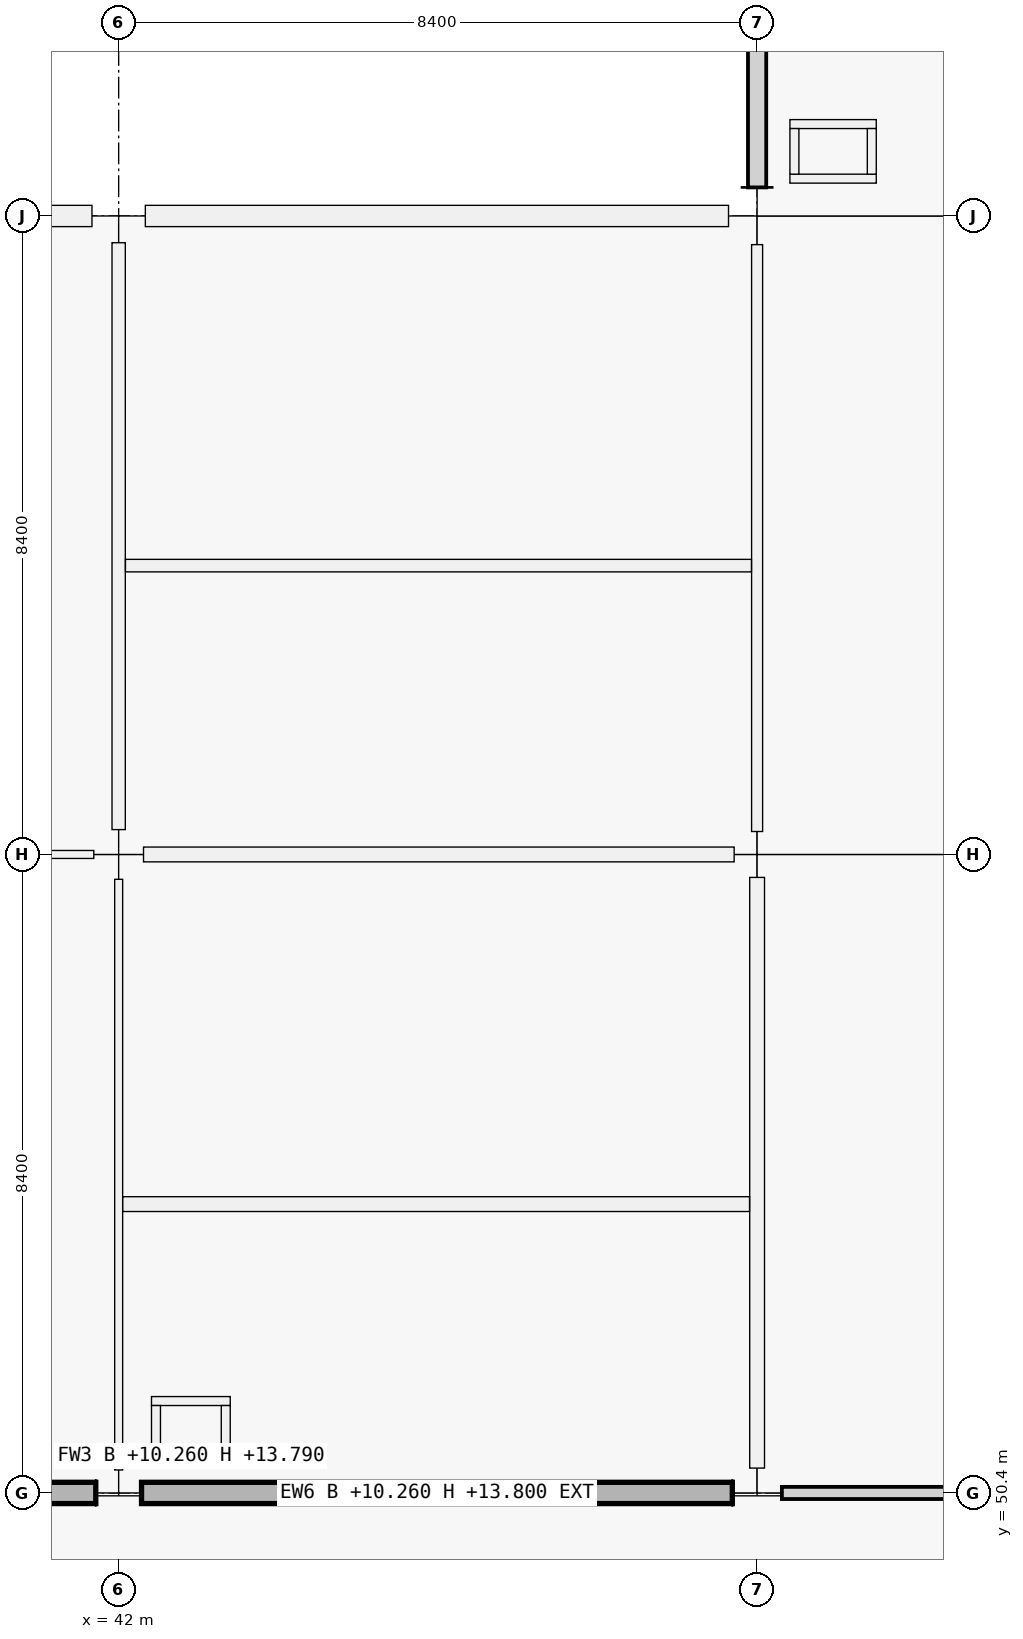
"""IFC4 building model, lengths in metres.
Left out: names, types, materials, properties, quantities, classifications, styles, units other than length and angle.
Written with IfcOpenShell. Run it as: python <this file> out.ifc"""

import sys

from ifc_helpers import new_model, si_unit, direction, frame, frame_2d, origin, origin_2d, place, context, subcontext, project, spatial, rectangle, extrude, element, fill, save


model = new_model("IFC4")
c1 = context("Model", 3, precision=1e-05, world=origin(), true_north=direction((0.0, 1.0)))
c2 = subcontext(c1, "Body", "Model", "MODEL_VIEW")
j1 = project(units=[si_unit("LENGTHUNIT", "METRE"), si_unit("PLANEANGLEUNIT", "RADIAN")], contexts=[c1])
p1 = place(None, origin())
s1 = spatial("IfcSite", under=j1, at=p1, CompositionType="ELEMENT")
p2 = place(p1, origin())
s2 = spatial("IfcBuilding", under=s1, at=p2, CompositionType="ELEMENT")
p3 = place(p2, frame((0.0, 0.0, 10.26)))
s3 = spatial("IfcBuildingStorey", under=s2, at=p3, CompositionType="ELEMENT", Elevation=10.26)
p4 = place(p3, frame((42.0, 50.4, 0.0), z_axis=(0.0, 0.0, 1.0), x_axis=(1.0, 0.0, 0.0)))
e1 = element("IfcColumn", 1, at=p4, inside=s3, PredefinedType="COLUMN", context=c2, shape_type="SweptSolid", body=[
    extrude(rectangle(XDim=0.6, YDim=0.6, at=origin_2d()), origin(), (0.0, 0.0, 1.0), 4.5),
])
p5 = place(p3, frame((42.0, 58.8, 0.0), z_axis=(0.0, 0.0, 1.0), x_axis=(1.0, 0.0, 0.0)))
e2 = element("IfcColumn", 2, at=p5, inside=s3, PredefinedType="COLUMN", context=c2, shape_type="SweptSolid", body=[
    extrude(rectangle(XDim=0.65, YDim=0.65, at=origin_2d()), origin(), (0.0, 0.0, 1.0), 4.5),
])
p6 = place(p3, frame((42.0, 67.2, 0.0), z_axis=(0.0, 0.0, 1.0), x_axis=(1.0, 0.0, 0.0)))
e3 = element("IfcColumn", 3, at=p6, inside=s3, PredefinedType="COLUMN", context=c2, shape_type="SweptSolid", body=[
    extrude(rectangle(XDim=0.7, YDim=0.7, at=origin_2d()), origin(), (0.0, 0.0, 1.0), 4.5),
])
p7 = place(p3, frame((50.4, 50.4, 0.0), z_axis=(0.0, 0.0, 1.0), x_axis=(1.0, 0.0, 0.0)))
e4 = element("IfcColumn", 4, at=p7, inside=s3, PredefinedType="COLUMN", context=c2, shape_type="SweptSolid", body=[
    extrude(rectangle(XDim=0.65, YDim=0.65, at=origin_2d()), origin(), (0.0, 0.0, 1.0), 4.5),
])
p8 = place(p3, frame((50.4, 58.8, 0.0), z_axis=(0.0, 0.0, 1.0), x_axis=(1.0, 0.0, 0.0)))
e5 = element("IfcColumn", 5, at=p8, inside=s3, PredefinedType="COLUMN", context=c2, shape_type="SweptSolid", body=[
    extrude(rectangle(XDim=0.6, YDim=0.6, at=origin_2d()), origin(), (0.0, 0.0, 1.0), 4.5),
])
p9 = place(p3, frame((50.4, 67.2, 0.0), z_axis=(0.0, 0.0, 1.0), x_axis=(1.0, 0.0, 0.0)))
e6 = element("IfcColumn", 6, at=p9, inside=s3, PredefinedType="COLUMN", context=c2, shape_type="SweptSolid", body=[
    extrude(rectangle(XDim=0.75, YDim=0.75, at=origin_2d()), origin(), (0.0, 0.0, 1.0), 4.5),
])
p10 = place(p3, frame((41.699, 50.4, 0.0), z_axis=(0.0, 0.0, 1.0), x_axis=(-1.0, 0.0, 0.0)))
e7 = element("IfcWall", 7, at=p10, inside=s3, PredefinedType="SOLIDWALL", context=c2, shape_type="SweptSolid", body=[
    extrude(rectangle(XDim=7.723, YDim=0.28, at=frame_2d((3.861, 0.0))), origin(), (0.0, 0.0, 1.0), 3.54),
])
p11 = place(p10, frame((2.761, 0.0, 0.9)))
e8 = element("IfcOpeningElement", 8, at=p11, cuts=e7, PredefinedType="OPENING", context=c2, shape_type="SweptSolid", body=[
    extrude(rectangle(XDim=2.2, YDim=1.35, at=frame_2d((1.1, 0.675))), frame((0.0, 0.14, 0.0), z_axis=(0.0, -1.0, 0.0), x_axis=(1.0, 0.0, 0.0)), (0.0, 0.0, 1.0), 0.28),
])
p12 = place(p3, frame((33.976, 67.2, 0.0), z_axis=(0.0, 0.0, 1.0), x_axis=(1.0, 0.0, 0.0)))
e9 = element("IfcWall", 9, at=p12, inside=s3, PredefinedType="SOLIDWALL", context=c2, shape_type="SweptSolid", body=[
    extrude(rectangle(XDim=7.673, YDim=0.28, at=frame_2d((3.836, 0.0))), origin(), (0.0, 0.0, 1.0), 3.54),
])
p13 = place(p12, frame((2.937, 0.0, 0.9)))
e10 = element("IfcOpeningElement", 10, at=p13, cuts=e9, PredefinedType="OPENING", context=c2, shape_type="SweptSolid", body=[
    extrude(rectangle(XDim=1.8, YDim=1.35, at=frame_2d((0.9, 0.675))), frame((0.0, 0.14, 0.0), z_axis=(0.0, -1.0, 0.0), x_axis=(1.0, 0.0, 0.0)), (0.0, 0.0, 1.0), 0.28),
])
p14 = place(p3, frame((50.074, 50.4, 0.0), z_axis=(0.0, 0.0, 1.0), x_axis=(-1.0, 0.0, 0.0)))
e11 = element("IfcWall", 11, at=p14, inside=s3, PredefinedType="SOLIDWALL", context=c2, shape_type="SweptSolid", body=[
    extrude(rectangle(XDim=7.773, YDim=0.28, at=frame_2d((3.886, 0.0))), origin(), (0.0, 0.0, 1.0), 3.54),
])
p15 = place(p14, frame((2.936, 0.0, 0.9)))
e12 = element("IfcOpeningElement", 12, at=p15, cuts=e11, PredefinedType="OPENING", context=c2, shape_type="SweptSolid", body=[
    extrude(rectangle(XDim=1.9, YDim=1.75, at=frame_2d((0.95, 0.875))), frame((0.0, 0.14, 0.0), z_axis=(0.0, -1.0, 0.0), x_axis=(1.0, 0.0, 0.0)), (0.0, 0.0, 1.0), 0.28),
])
p16 = place(p3, frame((42.351, 67.2, 0.0), z_axis=(0.0, 0.0, 1.0), x_axis=(1.0, 0.0, 0.0)))
e13 = element("IfcWall", 13, at=p16, inside=s3, PredefinedType="SOLIDWALL", context=c2, shape_type="SweptSolid", body=[
    extrude(rectangle(XDim=7.673, YDim=0.28, at=frame_2d((3.836, 0.0))), origin(), (0.0, 0.0, 1.0), 3.54),
])
p17 = place(p16, frame((3.136, 0.0, 0.9)))
e14 = element("IfcOpeningElement", 14, at=p17, cuts=e13, PredefinedType="OPENING", context=c2, shape_type="SweptSolid", body=[
    extrude(rectangle(XDim=1.4, YDim=1.75, at=frame_2d((0.7, 0.875))), frame((0.0, 0.14, 0.0), z_axis=(0.0, -1.0, 0.0), x_axis=(1.0, 0.0, 0.0)), (0.0, 0.0, 1.0), 0.28),
])
for number, where, z_axis, x_axis in (
    (15, (42.432, 50.891, 0.0), (0.0, 0.0, 1.0), (1.0, 0.0, 0.0)),
    (16, (42.432, 51.609, 0.0), (0.0, 0.0, 1.0), (1.0, 0.0, 0.0)),
):
    element("IfcWall", number, at=place(p3, frame(where, z_axis=z_axis, x_axis=x_axis)), inside=s3, PredefinedType="PARTITIONING", context=c2, shape_type="SweptSolid", body=[
        extrude(rectangle(XDim=1.036, YDim=0.118, at=frame_2d((0.518, 0.0))), origin(), (0.0, 0.0, 1.0), 3.53),
    ])
for number, where, z_axis, x_axis in (
    (17, (42.491, 50.95, 0.0), (0.0, 0.0, 1.0), (0.0, 1.0, 0.0)),
    (18, (43.409, 50.95, 0.0), (0.0, 0.0, 1.0), (0.0, 1.0, 0.0)),
):
    element("IfcWall", number, at=place(p3, frame(where, z_axis=z_axis, x_axis=x_axis)), inside=s3, PredefinedType="PARTITIONING", context=c2, shape_type="SweptSolid", body=[
        extrude(rectangle(XDim=0.6, YDim=0.118, at=frame_2d((0.3, 0.0))), origin(), (0.0, 0.0, 1.0), 3.53),
    ])
for number, where, z_axis, x_axis in (
    (19, (50.832, 67.691, 0.0), (0.0, 0.0, 1.0), (1.0, 0.0, 0.0)),
    (20, (50.832, 68.409, 0.0), (0.0, 0.0, 1.0), (1.0, 0.0, 0.0)),
):
    element("IfcWall", number, at=place(p3, frame(where, z_axis=z_axis, x_axis=x_axis)), inside=s3, PredefinedType="PARTITIONING", context=c2, shape_type="SweptSolid", body=[
        extrude(rectangle(XDim=1.136, YDim=0.118, at=frame_2d((0.568, 0.0))), origin(), (0.0, 0.0, 1.0), 3.53),
    ])
for number, where, z_axis, x_axis in (
    (21, (50.891, 67.75, 0.0), (0.0, 0.0, 1.0), (0.0, 1.0, 0.0)),
    (22, (51.909, 67.75, 0.0), (0.0, 0.0, 1.0), (0.0, 1.0, 0.0)),
):
    element("IfcWall", number, at=place(p3, frame(where, z_axis=z_axis, x_axis=x_axis)), inside=s3, PredefinedType="PARTITIONING", context=c2, shape_type="SweptSolid", body=[
        extrude(rectangle(XDim=0.6, YDim=0.118, at=frame_2d((0.3, 0.0))), origin(), (0.0, 0.0, 1.0), 3.53),
    ])
p18 = place(p3, frame((33.952, 58.8, 0.0), z_axis=(0.0, 0.0, 1.0), x_axis=(1.0, 0.0, 0.0)))
e23 = element("IfcWall", 23, at=p18, inside=s3, PredefinedType="PARTITIONING", context=c2, shape_type="SweptSolid", body=[
    extrude(rectangle(XDim=7.721, YDim=0.105, at=frame_2d((3.861, 0.0))), origin(), (0.0, 0.0, 1.0), 3.37),
])
p19 = place(p18, frame((3.351, 0.0, 0.0)))
e24 = element("IfcOpeningElement", 24, at=p19, cuts=e23, PredefinedType="OPENING", context=c2, shape_type="SweptSolid", body=[
    extrude(rectangle(XDim=1.02, YDim=2.2, at=frame_2d((0.51, 1.1))), frame((0.0, 0.052, 0.0), z_axis=(0.0, -1.0, 0.0), x_axis=(1.0, 0.0, 0.0)), (0.0, 0.0, 1.0), 0.105),
])
p20 = place(p3, frame((42.327, 58.8, 0.0), z_axis=(0.0, 0.0, 1.0), x_axis=(1.0, 0.0, 0.0)))
e25 = element("IfcWall", 25, at=p20, inside=s3, PredefinedType="PARTITIONING", context=c2, shape_type="SweptSolid", body=[
    extrude(rectangle(XDim=7.771, YDim=0.195, at=frame_2d((3.885, 0.0))), origin(), (0.0, 0.0, 1.0), 3.37),
])
p21 = place(p3, frame((42.0, 50.702, 0.0), z_axis=(0.0, 0.0, 1.0), x_axis=(0.0, 1.0, 0.0)))
e26 = element("IfcWall", 26, at=p21, inside=s3, PredefinedType="PARTITIONING", context=c2, shape_type="SweptSolid", body=[
    extrude(rectangle(XDim=7.771, YDim=0.105, at=frame_2d((3.885, 0.0))), origin(), (0.0, 0.0, 1.0), 3.37),
])
p22 = place(p3, frame((42.0, 59.127, 0.0), z_axis=(0.0, 0.0, 1.0), x_axis=(0.0, 1.0, 0.0)))
e27 = element("IfcWall", 27, at=p22, inside=s3, PredefinedType="PARTITIONING", context=c2, shape_type="SweptSolid", body=[
    extrude(rectangle(XDim=7.721, YDim=0.175, at=frame_2d((3.86, 0.0))), origin(), (0.0, 0.0, 1.0), 3.37),
])
p23 = place(p3, frame((50.4, 50.727, 0.0), z_axis=(0.0, 0.0, 1.0), x_axis=(0.0, 1.0, 0.0)))
e28 = element("IfcWall", 28, at=p23, inside=s3, PredefinedType="PARTITIONING", context=c2, shape_type="SweptSolid", body=[
    extrude(rectangle(XDim=7.771, YDim=0.195, at=frame_2d((3.885, 0.0))), origin(), (0.0, 0.0, 1.0), 3.37),
])
p24 = place(p23, frame((1.173, 0.0, 0.0)))
e29 = element("IfcOpeningElement", 29, at=p24, cuts=e28, PredefinedType="OPENING", context=c2, shape_type="SweptSolid", body=[
    extrude(rectangle(XDim=1.08, YDim=2.25, at=frame_2d((0.54, 1.125))), frame((0.0, 0.098, 0.0), z_axis=(0.0, -1.0, 0.0), x_axis=(1.0, 0.0, 0.0)), (0.0, 0.0, 1.0), 0.195),
])
p25 = place(p23, frame((5.103, 0.0, 0.0)))
e30 = element("IfcOpeningElement", 30, at=p25, cuts=e28, PredefinedType="OPENING", context=c2, shape_type="SweptSolid", body=[
    extrude(rectangle(XDim=1.06, YDim=2.25, at=frame_2d((0.53, 1.125))), frame((0.0, 0.098, 0.0), z_axis=(0.0, -1.0, 0.0), x_axis=(1.0, 0.0, 0.0)), (0.0, 0.0, 1.0), 0.195),
])
p26 = place(p3, frame((50.4, 59.102, 0.0), z_axis=(0.0, 0.0, 1.0), x_axis=(0.0, 1.0, 0.0)))
e31 = element("IfcWall", 31, at=p26, inside=s3, PredefinedType="PARTITIONING", context=c2, shape_type="SweptSolid", body=[
    extrude(rectangle(XDim=7.721, YDim=0.145, at=frame_2d((3.86, 0.0))), origin(), (0.0, 0.0, 1.0), 3.37),
])
p27 = place(p26, frame((1.218, 0.0, 0.0)))
e32 = element("IfcOpeningElement", 32, at=p27, cuts=e31, PredefinedType="OPENING", context=c2, shape_type="SweptSolid", body=[
    extrude(rectangle(XDim=1.04, YDim=2.2, at=frame_2d((0.52, 1.1))), frame((0.0, 0.073, 0.0), z_axis=(0.0, -1.0, 0.0), x_axis=(1.0, 0.0, 0.0)), (0.0, 0.0, 1.0), 0.145),
])
p28 = place(p26, frame((5.148, 0.0, 0.0)))
e33 = element("IfcOpeningElement", 33, at=p28, cuts=e31, PredefinedType="OPENING", context=c2, shape_type="SweptSolid", body=[
    extrude(rectangle(XDim=1.02, YDim=2.2, at=frame_2d((0.51, 1.1))), frame((0.0, 0.073, 0.0), z_axis=(0.0, -1.0, 0.0), x_axis=(1.0, 0.0, 0.0)), (0.0, 0.0, 1.0), 0.145),
])
p29 = place(p3, frame((42.054, 54.2, 0.0), z_axis=(0.0, 0.0, 1.0), x_axis=(1.0, 0.0, 0.0)))
e34 = element("IfcWall", 34, at=p29, inside=s3, PredefinedType="PARTITIONING", context=c2, shape_type="SweptSolid", body=[
    extrude(rectangle(XDim=8.246, YDim=0.195, at=frame_2d((4.123, 0.0))), origin(), (0.0, 0.0, 1.0), 3.37),
])
p30 = place(p3, frame((42.09, 62.6, 0.0), z_axis=(0.0, 0.0, 1.0), x_axis=(1.0, 0.0, 0.0)))
e35 = element("IfcWall", 35, at=p30, inside=s3, PredefinedType="PARTITIONING", context=c2, shape_type="SweptSolid", body=[
    extrude(rectangle(XDim=8.236, YDim=0.165, at=frame_2d((4.118, 0.0))), origin(), (0.0, 0.0, 1.0), 3.37),
])
p31 = place(p15, origin())
e36 = element("IfcWindow", 36, at=p31, inside=s3, PartitioningType="SINGLE_PANEL", PredefinedType="WINDOW", context=c2, shape_type="SweptSolid", body=[
    extrude(rectangle(XDim=1.9, YDim=1.75, at=frame_2d((0.95, 0.875))), frame((0.0, 0.03, 0.0), z_axis=(0.0, -1.0, 0.0), x_axis=(1.0, 0.0, 0.0)), (0.0, 0.0, 1.0), 0.06),
])
fill(e12, e36)
p32 = place(p17, origin())
e37 = element("IfcWindow", 37, at=p32, inside=s3, PartitioningType="SINGLE_PANEL", PredefinedType="WINDOW", context=c2, shape_type="SweptSolid", body=[
    extrude(rectangle(XDim=1.4, YDim=1.75, at=frame_2d((0.7, 0.875))), frame((0.0, 0.03, 0.0), z_axis=(0.0, -1.0, 0.0), x_axis=(1.0, 0.0, 0.0)), (0.0, 0.0, 1.0), 0.06),
])
fill(e14, e37)
p33 = place(p24, origin())
e38 = element("IfcDoor", 38, at=p33, inside=s3, OperationType="SINGLE_SWING_RIGHT", PredefinedType="DOOR", context=c2, shape_type="SweptSolid", body=[
    extrude(rectangle(XDim=1.08, YDim=2.25, at=frame_2d((0.54, 1.125))), frame((0.0, 0.025, 0.0), z_axis=(0.0, -1.0, 0.0), x_axis=(1.0, 0.0, 0.0)), (0.0, 0.0, 1.0), 0.05),
])
fill(e29, e38)
p34 = place(p25, origin())
e39 = element("IfcDoor", 39, at=p34, inside=s3, OperationType="SINGLE_SWING_LEFT", PredefinedType="DOOR", context=c2, shape_type="SweptSolid", body=[
    extrude(rectangle(XDim=1.06, YDim=2.25, at=frame_2d((0.53, 1.125))), frame((0.0, 0.025, 0.0), z_axis=(0.0, -1.0, 0.0), x_axis=(1.0, 0.0, 0.0)), (0.0, 0.0, 1.0), 0.05),
])
fill(e30, e39)
p35 = place(p27, origin())
e40 = element("IfcDoor", 40, at=p35, inside=s3, OperationType="SINGLE_SWING_RIGHT", PredefinedType="DOOR", context=c2, shape_type="SweptSolid", body=[
    extrude(rectangle(XDim=1.04, YDim=2.2, at=frame_2d((0.52, 1.1))), frame((0.0, 0.025, 0.0), z_axis=(0.0, -1.0, 0.0), x_axis=(1.0, 0.0, 0.0)), (0.0, 0.0, 1.0), 0.05),
])
fill(e32, e40)
p36 = place(p28, origin())
e41 = element("IfcDoor", 41, at=p36, inside=s3, OperationType="SINGLE_SWING_LEFT", PredefinedType="DOOR", context=c2, shape_type="SweptSolid", body=[
    extrude(rectangle(XDim=1.02, YDim=2.2, at=frame_2d((0.51, 1.1))), frame((0.0, 0.025, 0.0), z_axis=(0.0, -1.0, 0.0), x_axis=(1.0, 0.0, 0.0)), (0.0, 0.0, 1.0), 0.05),
])
fill(e33, e41)
save(model, sys.argv[1])
